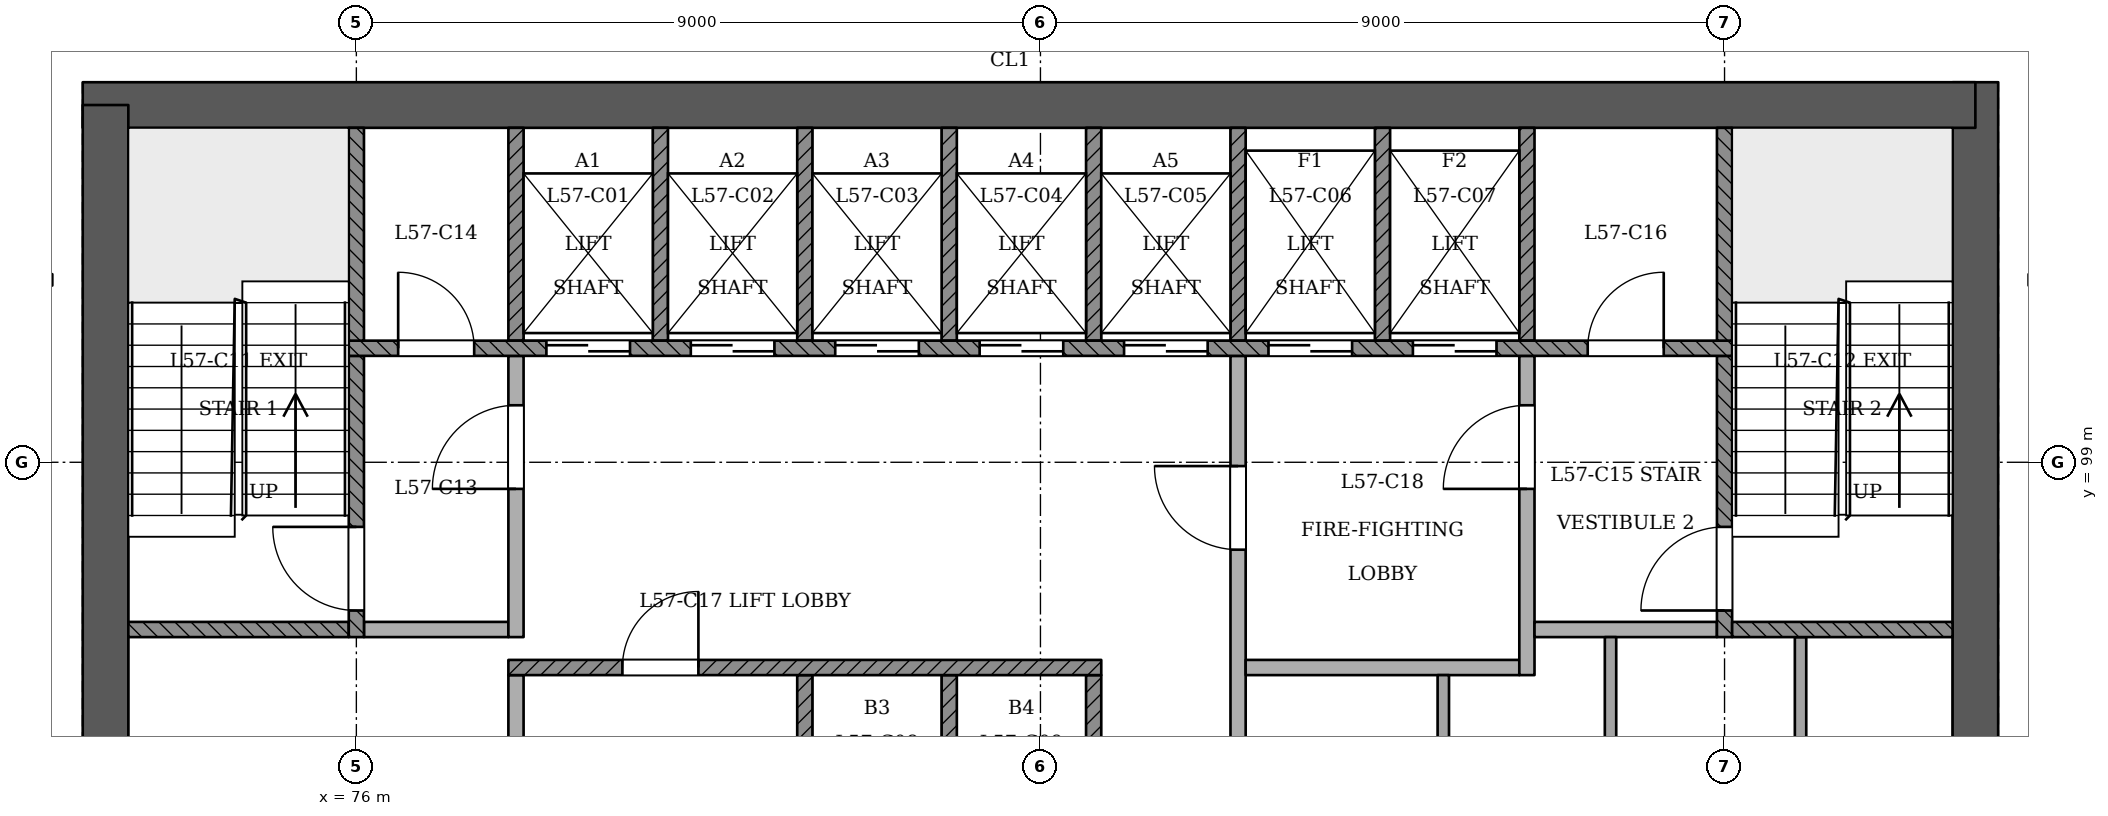
"""IFC4 building model, lengths in metres.
Left out: names, types, materials, properties, quantities, classifications, styles, units other than length and angle.
Written with IfcOpenShell. Run it as: python <this file> out.ifc"""

import sys

from ifc_helpers import new_model, si_unit, direction, frame, frame_2d, origin, place, context, subcontext, project, spatial, rectangle, extrude, element, fill, save


model = new_model("IFC4")
c1 = context("Model", 3, precision=1e-05, world=origin(), true_north=direction((0.0, 1.0)))
c2 = subcontext(c1, "Body", "Model", "MODEL_VIEW")
j1 = project(units=[si_unit("LENGTHUNIT", "METRE"), si_unit("PLANEANGLEUNIT", "RADIAN")], contexts=[c1])
p1 = place(None, origin())
s1 = spatial("IfcSite", under=j1, at=p1, CompositionType="ELEMENT")
p2 = place(p1, origin())
s2 = spatial("IfcBuilding", under=s1, at=p2, CompositionType="ELEMENT")
p3 = place(p2, frame((0.0, 0.0, 223.0)))
s3 = spatial("IfcBuildingStorey", under=s2, at=p3, CompositionType="ELEMENT", Elevation=223.0)
p4 = place(p3, frame((97.3, 93.1, 0.0), z_axis=(0.0, 0.0, 1.0), x_axis=(0.0, 1.0, 0.0)))
e1 = element("IfcWall", 1, at=p4, inside=s3, PredefinedType="SHEAR", context=c2, shape_type="SweptSolid", body=[
    extrude(rectangle(XDim=10.9, YDim=0.6, at=frame_2d((5.45, 0.0))), origin(), (0.0, 0.0, 1.0), 3.6),
])
p5 = place(p3, frame((97.3, 103.7, 0.0), z_axis=(0.0, 0.0, 1.0), x_axis=(-1.0, 0.0, 0.0)))
e2 = element("IfcWall", 2, at=p5, inside=s3, PredefinedType="SHEAR", context=c2, shape_type="SweptSolid", body=[
    extrude(rectangle(XDim=24.9, YDim=0.6, at=frame_2d((12.45, 0.0))), origin(), (0.0, 0.0, 1.0), 3.6),
])
p6 = place(p3, frame((72.7, 103.7, 0.0), z_axis=(0.0, 0.0, 1.0), x_axis=(0.0, -1.0, 0.0)))
e3 = element("IfcWall", 3, at=p6, inside=s3, PredefinedType="SHEAR", context=c2, shape_type="SweptSolid", body=[
    extrude(rectangle(XDim=10.9, YDim=0.6, at=frame_2d((5.45, 0.0))), origin(), (0.0, 0.0, 1.0), 3.6),
])
p7 = place(p3, frame((72.0, 101.4, 0.0), z_axis=(0.0, 0.0, 1.0), x_axis=(-1.0, 0.0, 0.0)))
e4 = element("IfcWall", 4, at=p7, inside=s3, PredefinedType="PARTITIONING", context=c2, shape_type="SweptSolid", body=[
    extrude(rectangle(XDim=1.8, YDim=0.15, at=frame_2d((0.9, 0.0))), origin(), (0.0, 0.0, 1.0), 3.2),
])
p8 = place(p3, frame((78.1, 93.4, 0.0), z_axis=(0.0, 0.0, 1.0), x_axis=(0.0, 1.0, 0.0)))
e5 = element("IfcWall", 5, at=p8, inside=s3, PredefinedType="PARTITIONING", context=c2, shape_type="SweptSolid", body=[
    extrude(rectangle(XDim=2.8, YDim=0.2, at=frame_2d((1.4, 0.0))), origin(), (0.0, 0.0, 1.0), 3.2),
])
for number, where, z_axis, x_axis in (
    (6, (81.9, 93.4, 0.0), (0.0, 0.0, 1.0), (0.0, 1.0, 0.0)),
    (7, (83.8, 93.4, 0.0), (0.0, 0.0, 1.0), (0.0, 1.0, 0.0)),
    (8, (85.7, 93.4, 0.0), (0.0, 0.0, 1.0), (0.0, 1.0, 0.0)),
):
    element("IfcWall", number, at=place(p3, frame(where, z_axis=z_axis, x_axis=x_axis)), inside=s3, PredefinedType="SOLIDWALL", context=c2, shape_type="SweptSolid", body=[
        extrude(rectangle(XDim=2.8, YDim=0.2, at=frame_2d((1.4, 0.0))), origin(), (0.0, 0.0, 1.0), 3.2),
    ])
p9 = place(p3, frame((87.6, 93.4, 0.0), z_axis=(0.0, 0.0, 1.0), x_axis=(0.0, 1.0, 0.0)))
e9 = element("IfcWall", 9, at=p9, inside=s3, PredefinedType="PARTITIONING", context=c2, shape_type="SweptSolid", body=[
    extrude(rectangle(XDim=7.0, YDim=0.2, at=frame_2d((3.5, 0.0))), origin(), (0.0, 0.0, 1.0), 3.2),
])
p10 = place(p9, frame((4.45, 0.0, 0.0)))
e10 = element("IfcOpeningElement", 10, at=p10, cuts=e9, PredefinedType="OPENING", context=c2, shape_type="SweptSolid", body=[
    extrude(rectangle(XDim=1.1, YDim=2.1, at=frame_2d((0.55, 1.05))), frame((0.0, 0.11, 0.0), z_axis=(0.0, -1.0, 0.0), x_axis=(1.0, 0.0, 0.0)), (0.0, 0.0, 1.0), 0.221),
])
p11 = place(p3, frame((90.3, 93.4, 0.0), z_axis=(0.0, 0.0, 1.0), x_axis=(0.0, 1.0, 0.0)))
e11 = element("IfcWall", 11, at=p11, inside=s3, PredefinedType="PARTITIONING", context=c2, shape_type="SweptSolid", body=[
    extrude(rectangle(XDim=2.8, YDim=0.15, at=frame_2d((1.4, 0.0))), origin(), (0.0, 0.0, 1.0), 3.2),
])
for number, where, z_axis, x_axis in (
    (12, (92.5, 93.4, 0.0), (0.0, 0.0, 1.0), (0.0, 1.0, 0.0)),
    (13, (95.0, 93.4, 0.0), (0.0, 0.0, 1.0), (0.0, 1.0, 0.0)),
):
    element("IfcWall", number, at=place(p3, frame(where, z_axis=z_axis, x_axis=x_axis)), inside=s3, PredefinedType="PARTITIONING", context=c2, shape_type="SweptSolid", body=[
        extrude(rectangle(XDim=3.3, YDim=0.15, at=frame_2d((1.65, 0.0))), origin(), (0.0, 0.0, 1.0), 3.2),
    ])
p12 = place(p3, frame((78.0, 96.3, 0.0), z_axis=(0.0, 0.0, 1.0), x_axis=(1.0, 0.0, 0.0)))
e14 = element("IfcWall", 14, at=p12, inside=s3, PredefinedType="SOLIDWALL", context=c2, shape_type="SweptSolid", body=[
    extrude(rectangle(XDim=7.8, YDim=0.2, at=frame_2d((3.9, 0.0))), origin(), (0.0, 0.0, 1.0), 3.2),
])
p13 = place(p12, frame((1.5, 0.0, 0.0)))
e15 = element("IfcOpeningElement", 15, at=p13, cuts=e14, PredefinedType="OPENING", context=c2, shape_type="SweptSolid", body=[
    extrude(rectangle(XDim=1.0, YDim=2.1, at=frame_2d((0.5, 1.05))), frame((0.0, 0.11, 0.0), z_axis=(0.0, -1.0, 0.0), x_axis=(1.0, 0.0, 0.0)), (0.0, 0.0, 1.0), 0.221),
])
p14 = place(p3, frame((87.7, 96.3, 0.0), z_axis=(0.0, 0.0, 1.0), x_axis=(1.0, 0.0, 0.0)))
e16 = element("IfcWall", 16, at=p14, inside=s3, PredefinedType="PARTITIONING", context=c2, shape_type="SweptSolid", body=[
    extrude(rectangle(XDim=3.6, YDim=0.2, at=frame_2d((1.8, 0.0))), origin(), (0.0, 0.0, 1.0), 3.2),
])
p15 = place(p3, frame((91.4, 96.2, 0.0), z_axis=(0.0, 0.0, 1.0), x_axis=(0.0, 1.0, 0.0)))
e17 = element("IfcWall", 17, at=p15, inside=s3, PredefinedType="PARTITIONING", context=c2, shape_type="SweptSolid", body=[
    extrude(rectangle(XDim=4.2, YDim=0.2, at=frame_2d((2.1, 0.0))), origin(), (0.0, 0.0, 1.0), 3.2),
])
p16 = place(p15, frame((2.45, 0.0, 0.0)))
e18 = element("IfcOpeningElement", 18, at=p16, cuts=e17, PredefinedType="OPENING", context=c2, shape_type="SweptSolid", body=[
    extrude(rectangle(XDim=1.1, YDim=2.1, at=frame_2d((0.55, 1.05))), frame((0.0, 0.11, 0.0), z_axis=(0.0, -1.0, 0.0), x_axis=(1.0, 0.0, 0.0)), (0.0, 0.0, 1.0), 0.221),
])
p17 = place(p3, frame((73.0, 96.8, 0.0), z_axis=(0.0, 0.0, 1.0), x_axis=(1.0, 0.0, 0.0)))
e19 = element("IfcWall", 19, at=p17, inside=s3, PredefinedType="SOLIDWALL", context=c2, shape_type="SweptSolid", body=[
    extrude(rectangle(XDim=2.9, YDim=0.2, at=frame_2d((1.45, 0.0))), origin(), (0.0, 0.0, 1.0), 3.2),
])
p18 = place(p3, frame((76.0, 96.7, 0.0), z_axis=(0.0, 0.0, 1.0), x_axis=(0.0, 1.0, 0.0)))
e20 = element("IfcWall", 20, at=p18, inside=s3, PredefinedType="SOLIDWALL", context=c2, shape_type="SweptSolid", body=[
    extrude(rectangle(XDim=3.7, YDim=0.2, at=frame_2d((1.85, 0.0))), origin(), (0.0, 0.0, 1.0), 3.2),
])
p19 = place(p18, frame((0.35, 0.0, 0.0)))
e21 = element("IfcOpeningElement", 21, at=p19, cuts=e20, PredefinedType="OPENING", context=c2, shape_type="SweptSolid", body=[
    extrude(rectangle(XDim=1.1, YDim=2.1, at=frame_2d((0.55, 1.05))), frame((0.0, 0.11, 0.0), z_axis=(0.0, -1.0, 0.0), x_axis=(1.0, 0.0, 0.0)), (0.0, 0.0, 1.0), 0.221),
])
p20 = place(p3, frame((76.1, 96.8, 0.0), z_axis=(0.0, 0.0, 1.0), x_axis=(1.0, 0.0, 0.0)))
e22 = element("IfcWall", 22, at=p20, inside=s3, PredefinedType="PARTITIONING", context=c2, shape_type="SweptSolid", body=[
    extrude(rectangle(XDim=1.9, YDim=0.2, at=frame_2d((0.95, 0.0))), origin(), (0.0, 0.0, 1.0), 3.2),
])
p21 = place(p3, frame((78.1, 96.7, 0.0), z_axis=(0.0, 0.0, 1.0), x_axis=(0.0, 1.0, 0.0)))
e23 = element("IfcWall", 23, at=p21, inside=s3, PredefinedType="PARTITIONING", context=c2, shape_type="SweptSolid", body=[
    extrude(rectangle(XDim=3.7, YDim=0.2, at=frame_2d((1.85, 0.0))), origin(), (0.0, 0.0, 1.0), 3.2),
])
p22 = place(p21, frame((1.95, 0.0, 0.0)))
e24 = element("IfcOpeningElement", 24, at=p22, cuts=e23, PredefinedType="OPENING", context=c2, shape_type="SweptSolid", body=[
    extrude(rectangle(XDim=1.1, YDim=2.1, at=frame_2d((0.55, 1.05))), frame((0.0, 0.11, 0.0), z_axis=(0.0, -1.0, 0.0), x_axis=(1.0, 0.0, 0.0)), (0.0, 0.0, 1.0), 0.221),
])
p23 = place(p3, frame((91.5, 96.8, 0.0), z_axis=(0.0, 0.0, 1.0), x_axis=(1.0, 0.0, 0.0)))
e25 = element("IfcWall", 25, at=p23, inside=s3, PredefinedType="PARTITIONING", context=c2, shape_type="SweptSolid", body=[
    extrude(rectangle(XDim=2.4, YDim=0.2, at=frame_2d((1.2, 0.0))), origin(), (0.0, 0.0, 1.0), 3.2),
])
p24 = place(p3, frame((94.0, 96.7, 0.0), z_axis=(0.0, 0.0, 1.0), x_axis=(0.0, 1.0, 0.0)))
e26 = element("IfcWall", 26, at=p24, inside=s3, PredefinedType="SOLIDWALL", context=c2, shape_type="SweptSolid", body=[
    extrude(rectangle(XDim=3.7, YDim=0.2, at=frame_2d((1.85, 0.0))), origin(), (0.0, 0.0, 1.0), 3.2),
])
p25 = place(p24, frame((0.35, 0.0, 0.0)))
e27 = element("IfcOpeningElement", 27, at=p25, cuts=e26, PredefinedType="OPENING", context=c2, shape_type="SweptSolid", body=[
    extrude(rectangle(XDim=1.1, YDim=2.1, at=frame_2d((0.55, 1.05))), frame((0.0, 0.11, 0.0), z_axis=(0.0, -1.0, 0.0), x_axis=(1.0, 0.0, 0.0)), (0.0, 0.0, 1.0), 0.221),
])
p26 = place(p3, frame((94.1, 96.8, 0.0), z_axis=(0.0, 0.0, 1.0), x_axis=(1.0, 0.0, 0.0)))
e28 = element("IfcWall", 28, at=p26, inside=s3, PredefinedType="SOLIDWALL", context=c2, shape_type="SweptSolid", body=[
    extrude(rectangle(XDim=2.9, YDim=0.2, at=frame_2d((1.45, 0.0))), origin(), (0.0, 0.0, 1.0), 3.2),
])
p27 = place(p3, frame((75.9, 100.5, 0.0), z_axis=(0.0, 0.0, 1.0), x_axis=(1.0, 0.0, 0.0)))
e29 = element("IfcWall", 29, at=p27, inside=s3, PredefinedType="SOLIDWALL", context=c2, shape_type="SweptSolid", body=[
    extrude(rectangle(XDim=18.2, YDim=0.2, at=frame_2d((9.1, 0.0))), origin(), (0.0, 0.0, 1.0), 3.2),
])
p28 = place(p27, frame((2.6, 0.0, 0.0)))
e30 = element("IfcOpeningElement", 30, at=p28, cuts=e29, PredefinedType="OPENING", context=c2, shape_type="SweptSolid", body=[
    extrude(rectangle(XDim=1.1, YDim=2.1, at=frame_2d((0.55, 1.05))), frame((0.0, 0.11, 0.0), z_axis=(0.0, -1.0, 0.0), x_axis=(1.0, 0.0, 0.0)), (0.0, 0.0, 1.0), 0.221),
])
p29 = place(p27, frame((4.5, 0.0, 0.0)))
e31 = element("IfcOpeningElement", 31, at=p29, cuts=e29, PredefinedType="OPENING", context=c2, shape_type="SweptSolid", body=[
    extrude(rectangle(XDim=1.1, YDim=2.1, at=frame_2d((0.55, 1.05))), frame((0.0, 0.11, 0.0), z_axis=(0.0, -1.0, 0.0), x_axis=(1.0, 0.0, 0.0)), (0.0, 0.0, 1.0), 0.221),
])
p30 = place(p27, frame((6.4, 0.0, 0.0)))
e32 = element("IfcOpeningElement", 32, at=p30, cuts=e29, PredefinedType="OPENING", context=c2, shape_type="SweptSolid", body=[
    extrude(rectangle(XDim=1.1, YDim=2.1, at=frame_2d((0.55, 1.05))), frame((0.0, 0.11, 0.0), z_axis=(0.0, -1.0, 0.0), x_axis=(1.0, 0.0, 0.0)), (0.0, 0.0, 1.0), 0.221),
])
p31 = place(p27, frame((8.3, 0.0, 0.0)))
e33 = element("IfcOpeningElement", 33, at=p31, cuts=e29, PredefinedType="OPENING", context=c2, shape_type="SweptSolid", body=[
    extrude(rectangle(XDim=1.1, YDim=2.1, at=frame_2d((0.55, 1.05))), frame((0.0, 0.11, 0.0), z_axis=(0.0, -1.0, 0.0), x_axis=(1.0, 0.0, 0.0)), (0.0, 0.0, 1.0), 0.221),
])
p32 = place(p27, frame((10.2, 0.0, 0.0)))
e34 = element("IfcOpeningElement", 34, at=p32, cuts=e29, PredefinedType="OPENING", context=c2, shape_type="SweptSolid", body=[
    extrude(rectangle(XDim=1.1, YDim=2.1, at=frame_2d((0.55, 1.05))), frame((0.0, 0.11, 0.0), z_axis=(0.0, -1.0, 0.0), x_axis=(1.0, 0.0, 0.0)), (0.0, 0.0, 1.0), 0.221),
])
p33 = place(p27, frame((12.1, 0.0, 0.0)))
e35 = element("IfcOpeningElement", 35, at=p33, cuts=e29, PredefinedType="OPENING", context=c2, shape_type="SweptSolid", body=[
    extrude(rectangle(XDim=1.1, YDim=2.1, at=frame_2d((0.55, 1.05))), frame((0.0, 0.11, 0.0), z_axis=(0.0, -1.0, 0.0), x_axis=(1.0, 0.0, 0.0)), (0.0, 0.0, 1.0), 0.221),
])
p34 = place(p27, frame((14.0, 0.0, 0.0)))
e36 = element("IfcOpeningElement", 36, at=p34, cuts=e29, PredefinedType="OPENING", context=c2, shape_type="SweptSolid", body=[
    extrude(rectangle(XDim=1.1, YDim=2.1, at=frame_2d((0.55, 1.05))), frame((0.0, 0.11, 0.0), z_axis=(0.0, -1.0, 0.0), x_axis=(1.0, 0.0, 0.0)), (0.0, 0.0, 1.0), 0.221),
])
p35 = place(p27, frame((0.65, 0.0, 0.0)))
e37 = element("IfcOpeningElement", 37, at=p35, cuts=e29, PredefinedType="OPENING", context=c2, shape_type="SweptSolid", body=[
    extrude(rectangle(XDim=1.0, YDim=2.1, at=frame_2d((0.5, 1.05))), frame((0.0, 0.11, 0.0), z_axis=(0.0, -1.0, 0.0), x_axis=(1.0, 0.0, 0.0)), (0.0, 0.0, 1.0), 0.221),
])
p36 = place(p27, frame((16.3, 0.0, 0.0)))
e38 = element("IfcOpeningElement", 38, at=p36, cuts=e29, PredefinedType="OPENING", context=c2, shape_type="SweptSolid", body=[
    extrude(rectangle(XDim=1.0, YDim=2.1, at=frame_2d((0.5, 1.05))), frame((0.0, 0.11, 0.0), z_axis=(0.0, -1.0, 0.0), x_axis=(1.0, 0.0, 0.0)), (0.0, 0.0, 1.0), 0.221),
])
for number, where, z_axis, x_axis in (
    (39, (76.0, 100.6, 0.0), (0.0, 0.0, 1.0), (0.0, 1.0, 0.0)),
    (40, (78.1, 100.6, 0.0), (0.0, 0.0, 1.0), (0.0, 1.0, 0.0)),
    (41, (80.0, 100.6, 0.0), (0.0, 0.0, 1.0), (0.0, 1.0, 0.0)),
    (42, (81.9, 100.6, 0.0), (0.0, 0.0, 1.0), (0.0, 1.0, 0.0)),
    (43, (83.8, 100.6, 0.0), (0.0, 0.0, 1.0), (0.0, 1.0, 0.0)),
    (44, (85.7, 100.6, 0.0), (0.0, 0.0, 1.0), (0.0, 1.0, 0.0)),
    (45, (87.6, 100.6, 0.0), (0.0, 0.0, 1.0), (0.0, 1.0, 0.0)),
    (46, (89.5, 100.6, 0.0), (0.0, 0.0, 1.0), (0.0, 1.0, 0.0)),
    (47, (91.4, 100.6, 0.0), (0.0, 0.0, 1.0), (0.0, 1.0, 0.0)),
    (48, (94.0, 100.6, 0.0), (0.0, 0.0, 1.0), (0.0, 1.0, 0.0)),
):
    element("IfcWall", number, at=place(p3, frame(where, z_axis=z_axis, x_axis=x_axis)), inside=s3, PredefinedType="SOLIDWALL", context=c2, shape_type="SweptSolid", body=[
        extrude(rectangle(XDim=2.8, YDim=0.2, at=frame_2d((1.4, 0.0))), origin(), (0.0, 0.0, 1.0), 3.2),
    ])
p37 = place(p28, origin())
e49 = element("IfcDoor", 49, at=p37, inside=s3, OperationType="SLIDING_TO_RIGHT", PredefinedType="NOTDEFINED", context=c2, shape_type="SweptSolid", body=[
    extrude(rectangle(XDim=1.1, YDim=2.1, at=frame_2d((0.55, 1.05))), frame((0.0, 0.025, 0.0), z_axis=(0.0, -1.0, 0.0), x_axis=(1.0, 0.0, 0.0)), (0.0, 0.0, 1.0), 0.05),
])
fill(e30, e49)
p38 = place(p29, origin())
e50 = element("IfcDoor", 50, at=p38, inside=s3, OperationType="SLIDING_TO_LEFT", PredefinedType="NOTDEFINED", context=c2, shape_type="SweptSolid", body=[
    extrude(rectangle(XDim=1.1, YDim=2.1, at=frame_2d((0.55, 1.05))), frame((0.0, 0.025, 0.0), z_axis=(0.0, -1.0, 0.0), x_axis=(1.0, 0.0, 0.0)), (0.0, 0.0, 1.0), 0.05),
])
fill(e31, e50)
p39 = place(p30, origin())
e51 = element("IfcDoor", 51, at=p39, inside=s3, OperationType="SLIDING_TO_RIGHT", PredefinedType="NOTDEFINED", context=c2, shape_type="SweptSolid", body=[
    extrude(rectangle(XDim=1.1, YDim=2.1, at=frame_2d((0.55, 1.05))), frame((0.0, 0.025, 0.0), z_axis=(0.0, -1.0, 0.0), x_axis=(1.0, 0.0, 0.0)), (0.0, 0.0, 1.0), 0.05),
])
fill(e32, e51)
p40 = place(p31, origin())
e52 = element("IfcDoor", 52, at=p40, inside=s3, OperationType="SLIDING_TO_LEFT", PredefinedType="NOTDEFINED", context=c2, shape_type="SweptSolid", body=[
    extrude(rectangle(XDim=1.1, YDim=2.1, at=frame_2d((0.55, 1.05))), frame((0.0, 0.025, 0.0), z_axis=(0.0, -1.0, 0.0), x_axis=(1.0, 0.0, 0.0)), (0.0, 0.0, 1.0), 0.05),
])
fill(e33, e52)
p41 = place(p32, origin())
e53 = element("IfcDoor", 53, at=p41, inside=s3, OperationType="SLIDING_TO_RIGHT", PredefinedType="NOTDEFINED", context=c2, shape_type="SweptSolid", body=[
    extrude(rectangle(XDim=1.1, YDim=2.1, at=frame_2d((0.55, 1.05))), frame((0.0, 0.025, 0.0), z_axis=(0.0, -1.0, 0.0), x_axis=(1.0, 0.0, 0.0)), (0.0, 0.0, 1.0), 0.05),
])
fill(e34, e53)
p42 = place(p33, origin())
e54 = element("IfcDoor", 54, at=p42, inside=s3, OperationType="SLIDING_TO_RIGHT", PredefinedType="NOTDEFINED", context=c2, shape_type="SweptSolid", body=[
    extrude(rectangle(XDim=1.1, YDim=2.1, at=frame_2d((0.55, 1.05))), frame((0.0, 0.025, 0.0), z_axis=(0.0, -1.0, 0.0), x_axis=(1.0, 0.0, 0.0)), (0.0, 0.0, 1.0), 0.05),
])
fill(e35, e54)
p43 = place(p34, origin())
e55 = element("IfcDoor", 55, at=p43, inside=s3, OperationType="SLIDING_TO_LEFT", PredefinedType="NOTDEFINED", context=c2, shape_type="SweptSolid", body=[
    extrude(rectangle(XDim=1.1, YDim=2.1, at=frame_2d((0.55, 1.05))), frame((0.0, 0.025, 0.0), z_axis=(0.0, -1.0, 0.0), x_axis=(1.0, 0.0, 0.0)), (0.0, 0.0, 1.0), 0.05),
])
fill(e36, e55)
p44 = place(p19, origin())
e56 = element("IfcDoor", 56, at=p44, inside=s3, OperationType="SINGLE_SWING_RIGHT", PredefinedType="NOTDEFINED", context=c2, shape_type="SweptSolid", body=[
    extrude(rectangle(XDim=1.1, YDim=2.1, at=frame_2d((0.55, 1.05))), frame((0.0, 0.025, 0.0), z_axis=(0.0, -1.0, 0.0), x_axis=(1.0, 0.0, 0.0)), (0.0, 0.0, 1.0), 0.05),
])
fill(e21, e56)
p45 = place(p25, origin())
e57 = element("IfcDoor", 57, at=p45, inside=s3, OperationType="SINGLE_SWING_LEFT", PredefinedType="NOTDEFINED", context=c2, shape_type="SweptSolid", body=[
    extrude(rectangle(XDim=1.1, YDim=2.1, at=frame_2d((0.55, 1.05))), frame((0.0, 0.025, 0.0), z_axis=(0.0, -1.0, 0.0), x_axis=(1.0, 0.0, 0.0)), (0.0, 0.0, 1.0), 0.05),
])
fill(e27, e57)
p46 = place(p22, origin())
e58 = element("IfcDoor", 58, at=p46, inside=s3, OperationType="SINGLE_SWING_LEFT", PredefinedType="NOTDEFINED", context=c2, shape_type="SweptSolid", body=[
    extrude(rectangle(XDim=1.1, YDim=2.1, at=frame_2d((0.55, 1.05))), frame((0.0, 0.025, 0.0), z_axis=(0.0, -1.0, 0.0), x_axis=(1.0, 0.0, 0.0)), (0.0, 0.0, 1.0), 0.05),
])
fill(e24, e58)
p47 = place(p10, origin())
e59 = element("IfcDoor", 59, at=p47, inside=s3, OperationType="SINGLE_SWING_RIGHT", PredefinedType="NOTDEFINED", context=c2, shape_type="SweptSolid", body=[
    extrude(rectangle(XDim=1.1, YDim=2.1, at=frame_2d((0.55, 1.05))), frame((0.0, 0.025, 0.0), z_axis=(0.0, -1.0, 0.0), x_axis=(1.0, 0.0, 0.0)), (0.0, 0.0, 1.0), 0.05),
])
fill(e10, e59)
p48 = place(p16, origin())
e60 = element("IfcDoor", 60, at=p48, inside=s3, OperationType="SINGLE_SWING_LEFT", PredefinedType="NOTDEFINED", context=c2, shape_type="SweptSolid", body=[
    extrude(rectangle(XDim=1.1, YDim=2.1, at=frame_2d((0.55, 1.05))), frame((0.0, 0.025, 0.0), z_axis=(0.0, -1.0, 0.0), x_axis=(1.0, 0.0, 0.0)), (0.0, 0.0, 1.0), 0.05),
])
fill(e18, e60)
p49 = place(p35, origin())
e61 = element("IfcDoor", 61, at=p49, inside=s3, OperationType="SINGLE_SWING_LEFT", PredefinedType="NOTDEFINED", context=c2, shape_type="SweptSolid", body=[
    extrude(rectangle(XDim=1.0, YDim=2.1, at=frame_2d((0.5, 1.05))), frame((0.0, 0.025, 0.0), z_axis=(0.0, -1.0, 0.0), x_axis=(1.0, 0.0, 0.0)), (0.0, 0.0, 1.0), 0.05),
])
fill(e37, e61)
p50 = place(p36, origin())
e62 = element("IfcDoor", 62, at=p50, inside=s3, OperationType="SINGLE_SWING_RIGHT", PredefinedType="NOTDEFINED", context=c2, shape_type="SweptSolid", body=[
    extrude(rectangle(XDim=1.0, YDim=2.1, at=frame_2d((0.5, 1.05))), frame((0.0, 0.025, 0.0), z_axis=(0.0, -1.0, 0.0), x_axis=(1.0, 0.0, 0.0)), (0.0, 0.0, 1.0), 0.05),
])
fill(e38, e62)
p51 = place(p13, origin())
e63 = element("IfcDoor", 63, at=p51, inside=s3, OperationType="SINGLE_SWING_RIGHT", PredefinedType="NOTDEFINED", context=c2, shape_type="SweptSolid", body=[
    extrude(rectangle(XDim=1.0, YDim=2.1, at=frame_2d((0.5, 1.05))), frame((0.0, 0.025, 0.0), z_axis=(0.0, -1.0, 0.0), x_axis=(1.0, 0.0, 0.0)), (0.0, 0.0, 1.0), 0.05),
])
fill(e15, e63)
save(model, sys.argv[1])
